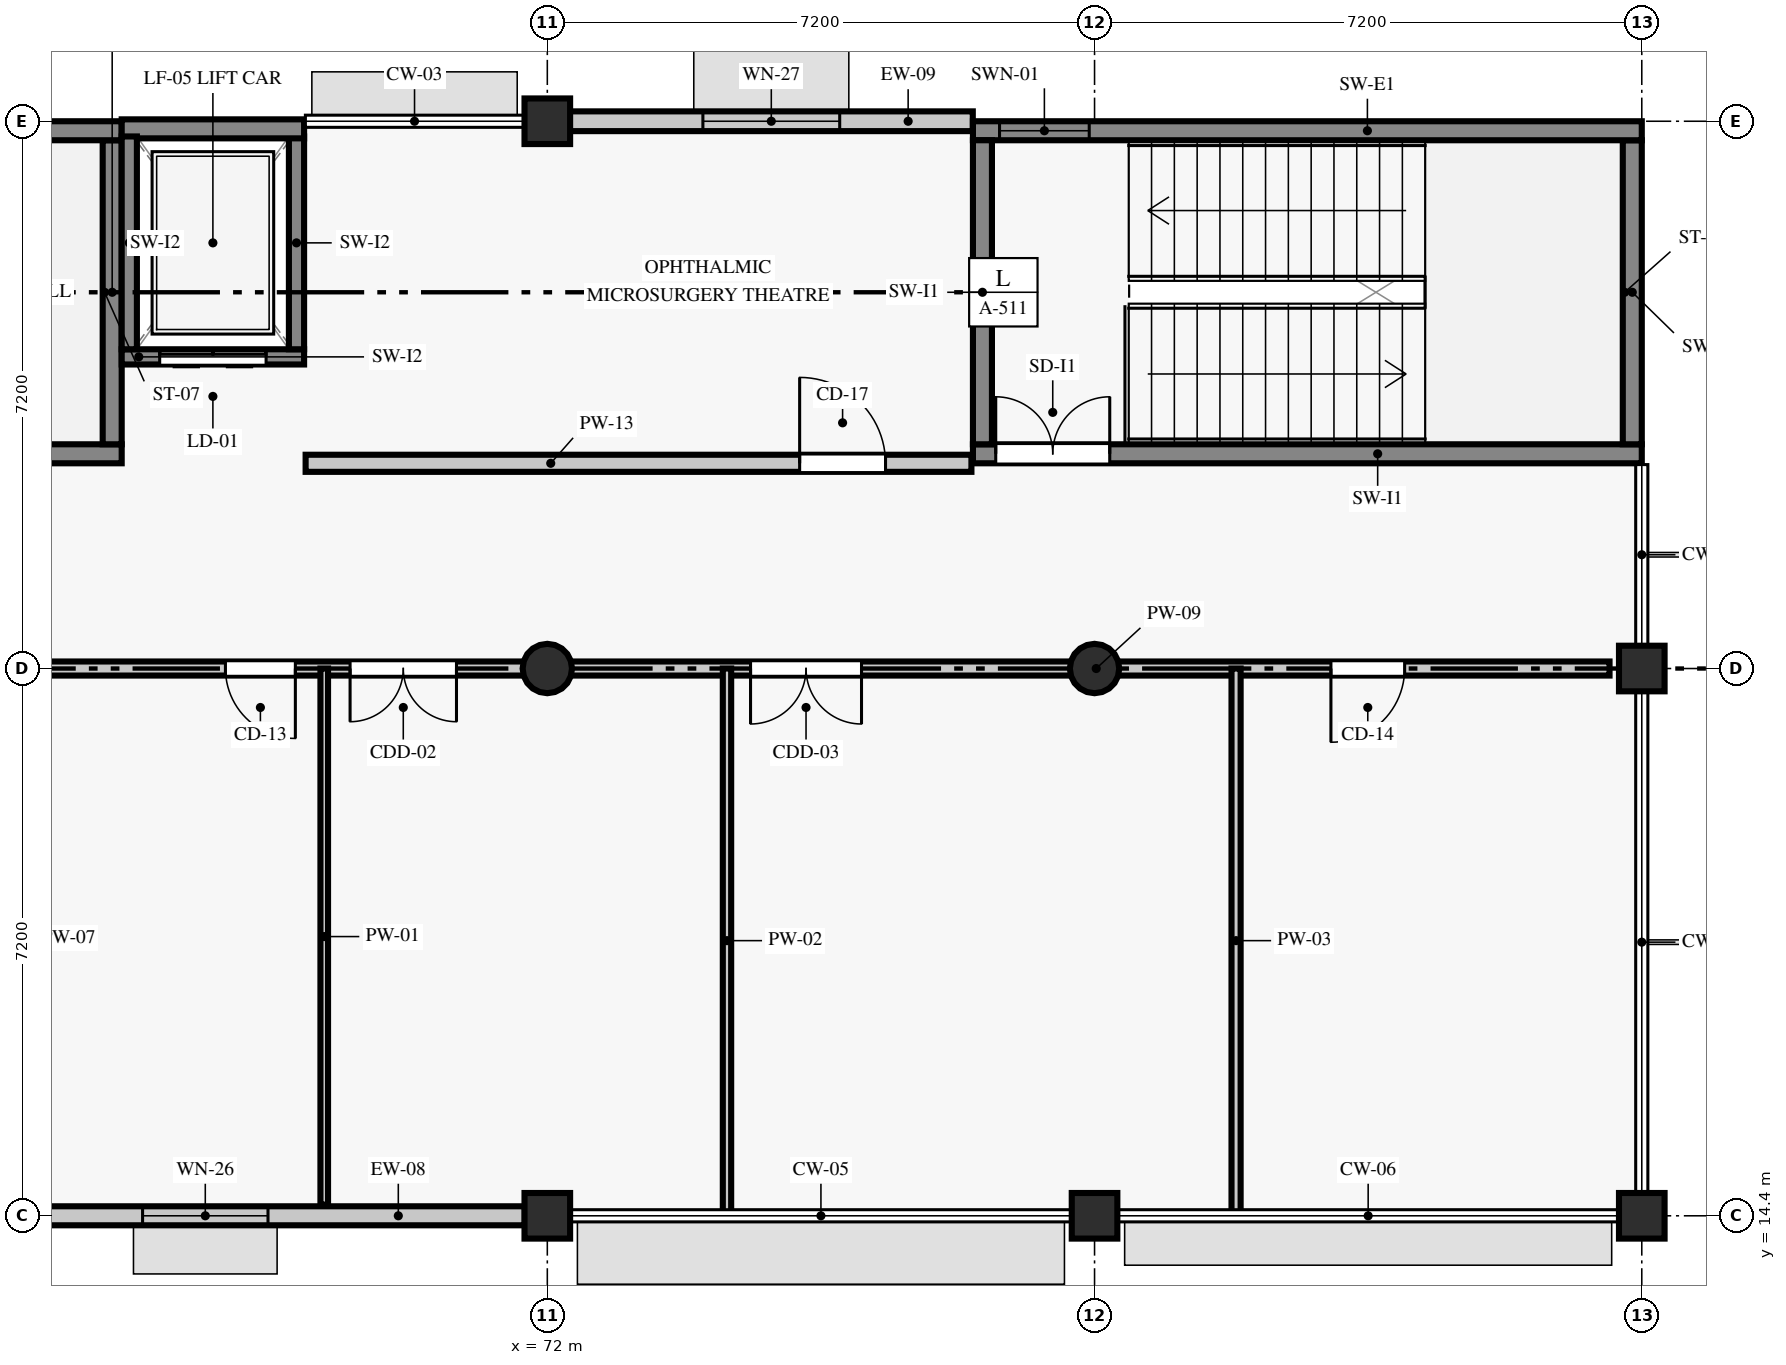
"""IFC4 building model, lengths in metres.
Left out: names, types, materials, properties, quantities, classifications, styles, units other than length and angle.
Written with IfcOpenShell. Run it as: python <this file> out.ifc"""

import sys

from ifc_helpers import new_model, si_unit, direction, frame, frame_2d, origin, origin_2d, place, context, subcontext, project, spatial, rectangle, circle, extrude, element, fill, save


model = new_model("IFC4")
c1 = context("Model", 3, precision=1e-05, world=origin(), true_north=direction((0.0, 1.0)))
c2 = subcontext(c1, "Body", "Model", "MODEL_VIEW")
j1 = project(units=[si_unit("LENGTHUNIT", "METRE"), si_unit("PLANEANGLEUNIT", "RADIAN")], contexts=[c1])
p1 = place(None, origin())
s1 = spatial("IfcSite", under=j1, at=p1, CompositionType="ELEMENT")
p2 = place(p1, origin())
s2 = spatial("IfcBuilding", under=s1, at=p2, CompositionType="ELEMENT")
p3 = place(p2, frame((0.0, 0.0, 9.6)))
s3 = spatial("IfcBuildingStorey", under=s2, at=p3, CompositionType="ELEMENT", Elevation=9.6)
p4 = place(p3, frame((72.0, 14.4, 0.0), z_axis=(0.0, 0.0, 1.0), x_axis=(1.0, 0.0, 0.0)))
e1 = element("IfcColumn", 1, at=p4, inside=s3, PredefinedType="COLUMN", context=c2, shape_type="SweptSolid", body=[
    extrude(rectangle(XDim=0.6, YDim=0.6, at=origin_2d()), origin(), (0.0, 0.0, 1.0), 3.9),
])
p5 = place(p3, frame((72.0, 21.6, 0.0), z_axis=(0.0, 0.0, 1.0), x_axis=(1.0, 0.0, 0.0)))
e2 = element("IfcColumn", 2, at=p5, inside=s3, PredefinedType="COLUMN", context=c2, shape_type="SweptSolid", body=[
    extrude(circle(Radius=0.325, at=origin_2d()), origin(), (0.0, 0.0, 1.0), 3.9),
])
for number, where, z_axis, x_axis in (
    (3, (72.0, 28.8, 0.0), (0.0, 0.0, 1.0), (1.0, 0.0, 0.0)),
    (4, (79.2, 14.4, 0.0), (0.0, 0.0, 1.0), (1.0, 0.0, 0.0)),
):
    element("IfcColumn", number, at=place(p3, frame(where, z_axis=z_axis, x_axis=x_axis)), inside=s3, PredefinedType="COLUMN", context=c2, shape_type="SweptSolid", body=[
        extrude(rectangle(XDim=0.6, YDim=0.6, at=origin_2d()), origin(), (0.0, 0.0, 1.0), 3.9),
    ])
p6 = place(p3, frame((79.2, 21.6, 0.0), z_axis=(0.0, 0.0, 1.0), x_axis=(1.0, 0.0, 0.0)))
e5 = element("IfcColumn", 5, at=p6, inside=s3, PredefinedType="COLUMN", context=c2, shape_type="SweptSolid", body=[
    extrude(circle(Radius=0.325, at=origin_2d()), origin(), (0.0, 0.0, 1.0), 3.9),
])
for number, where, z_axis, x_axis in (
    (6, (86.4, 14.4, 0.0), (0.0, 0.0, 1.0), (1.0, 0.0, 0.0)),
    (7, (86.4, 21.6, 0.0), (0.0, 0.0, 1.0), (1.0, 0.0, 0.0)),
):
    element("IfcColumn", number, at=place(p3, frame(where, z_axis=z_axis, x_axis=x_axis)), inside=s3, PredefinedType="COLUMN", context=c2, shape_type="SweptSolid", body=[
        extrude(rectangle(XDim=0.6, YDim=0.6, at=origin_2d()), origin(), (0.0, 0.0, 1.0), 3.9),
    ])
p7 = place(p3, frame((65.096, 14.4, 0.0), z_axis=(0.0, 0.0, 1.0), x_axis=(1.0, 0.0, 0.0)))
e8 = element("IfcWall", 8, at=p7, inside=s3, PredefinedType="STANDARD", context=c2, shape_type="SweptSolid", body=[
    extrude(rectangle(XDim=6.608, YDim=0.25, at=frame_2d((3.304, 0.0))), origin(), (0.0, 0.0, 1.0), 3.25),
])
p8 = place(p7, frame((1.579, 0.0, 0.9)))
e9 = element("IfcOpeningElement", 9, at=p8, cuts=e8, PredefinedType="OPENING", context=c2, shape_type="SweptSolid", body=[
    extrude(rectangle(XDim=1.65, YDim=1.54, at=frame_2d((0.825, 0.77))), frame((0.0, 0.135, 0.0), z_axis=(0.0, -1.0, 0.0), x_axis=(1.0, 0.0, 0.0)), (0.0, 0.0, 1.0), 0.27),
])
p9 = place(p3, frame((77.598, 28.8, 0.0), z_axis=(0.0, 0.0, 1.0), x_axis=(-1.0, 0.0, 0.0)))
e10 = element("IfcWall", 10, at=p9, inside=s3, PredefinedType="STANDARD", context=c2, shape_type="SweptSolid", body=[
    extrude(rectangle(XDim=5.302, YDim=0.26, at=frame_2d((2.651, 0.0))), origin(), (0.0, 0.0, 1.0), 3.9),
])
p10 = place(p9, frame((1.751, 0.0, 0.9)))
e11 = element("IfcOpeningElement", 11, at=p10, cuts=e10, PredefinedType="OPENING", context=c2, shape_type="SweptSolid", body=[
    extrude(rectangle(XDim=1.8, YDim=1.54, at=frame_2d((0.9, 0.77))), frame((0.0, 0.14, 0.0), z_axis=(0.0, -1.0, 0.0), x_axis=(1.0, 0.0, 0.0)), (0.0, 0.0, 1.0), 0.28),
])
p11 = place(p3, frame((57.6, 24.425, 0.0), z_axis=(0.0, 0.0, 1.0), x_axis=(1.0, 0.0, 0.0)))
e12 = element("IfcWall", 12, at=p11, inside=s3, PredefinedType="SHEAR", context=c2, shape_type="SweptSolid", body=[
    extrude(rectangle(XDim=8.8, YDim=0.25, at=frame_2d((4.4, 0.0))), origin(), (0.0, 0.0, 1.0), 3.9),
])
p12 = place(p11, frame((0.3, 0.0, 0.0)))
e13 = element("IfcOpeningElement", 13, at=p12, cuts=e12, PredefinedType="OPENING", context=c2, shape_type="SweptSolid", body=[
    extrude(rectangle(XDim=1.5, YDim=2.15, at=frame_2d((0.75, 1.075))), frame((0.0, 0.135, 0.0), z_axis=(0.0, -1.0, 0.0), x_axis=(1.0, 0.0, 0.0)), (0.0, 0.0, 1.0), 0.27),
])
p13 = place(p3, frame((66.275, 24.55, 0.0), z_axis=(0.0, 0.0, 1.0), x_axis=(0.0, 1.0, 0.0)))
e14 = element("IfcWall", 14, at=p13, inside=s3, PredefinedType="SHEAR", context=c2, shape_type="SweptSolid", body=[
    extrude(rectangle(XDim=4.0, YDim=0.25, at=frame_2d((2.0, 0.0))), origin(), (0.0, 0.0, 1.0), 3.9),
])
p14 = place(p3, frame((66.4, 28.675, 0.0), z_axis=(0.0, 0.0, 1.0), x_axis=(-1.0, 0.0, 0.0)))
e15 = element("IfcWall", 15, at=p14, inside=s3, PredefinedType="SHEAR", context=c2, shape_type="SweptSolid", body=[
    extrude(rectangle(XDim=8.8, YDim=0.25, at=frame_2d((4.4, 0.0))), origin(), (0.0, 0.0, 1.0), 3.9),
])
p15 = place(p14, frame((7.27, 0.0, 0.92)))
e16 = element("IfcOpeningElement", 16, at=p15, cuts=e15, PredefinedType="OPENING", context=c2, shape_type="SweptSolid", body=[
    extrude(rectangle(XDim=1.18, YDim=1.48, at=frame_2d((0.59, 0.74))), frame((0.0, 0.135, 0.0), z_axis=(0.0, -1.0, 0.0), x_axis=(1.0, 0.0, 0.0)), (0.0, 0.0, 1.0), 0.27),
])
p16 = place(p3, frame((77.6, 24.425, 0.0), z_axis=(0.0, 0.0, 1.0), x_axis=(1.0, 0.0, 0.0)))
e17 = element("IfcWall", 17, at=p16, inside=s3, PredefinedType="SHEAR", context=c2, shape_type="SweptSolid", body=[
    extrude(rectangle(XDim=8.8, YDim=0.25, at=frame_2d((4.4, 0.0))), origin(), (0.0, 0.0, 1.0), 3.9),
])
p17 = place(p16, frame((0.3, 0.0, 0.0)))
e18 = element("IfcOpeningElement", 18, at=p17, cuts=e17, PredefinedType="OPENING", context=c2, shape_type="SweptSolid", body=[
    extrude(rectangle(XDim=1.5, YDim=2.15, at=frame_2d((0.75, 1.075))), frame((0.0, 0.135, 0.0), z_axis=(0.0, -1.0, 0.0), x_axis=(1.0, 0.0, 0.0)), (0.0, 0.0, 1.0), 0.27),
])
p18 = place(p3, frame((86.275, 24.55, 0.0), z_axis=(0.0, 0.0, 1.0), x_axis=(0.0, 1.0, 0.0)))
e19 = element("IfcWall", 19, at=p18, inside=s3, PredefinedType="SHEAR", context=c2, shape_type="SweptSolid", body=[
    extrude(rectangle(XDim=4.0, YDim=0.25, at=frame_2d((2.0, 0.0))), origin(), (0.0, 0.0, 1.0), 3.9),
])
p19 = place(p3, frame((86.4, 28.675, 0.0), z_axis=(0.0, 0.0, 1.0), x_axis=(-1.0, 0.0, 0.0)))
e20 = element("IfcWall", 20, at=p19, inside=s3, PredefinedType="SHEAR", context=c2, shape_type="SweptSolid", body=[
    extrude(rectangle(XDim=8.8, YDim=0.25, at=frame_2d((4.4, 0.0))), origin(), (0.0, 0.0, 1.0), 3.9),
])
p20 = place(p19, frame((7.27, 0.0, 0.92)))
e21 = element("IfcOpeningElement", 21, at=p20, cuts=e20, PredefinedType="OPENING", context=c2, shape_type="SweptSolid", body=[
    extrude(rectangle(XDim=1.18, YDim=1.48, at=frame_2d((0.59, 0.74))), frame((0.0, 0.135, 0.0), z_axis=(0.0, -1.0, 0.0), x_axis=(1.0, 0.0, 0.0)), (0.0, 0.0, 1.0), 0.27),
])
p21 = place(p3, frame((77.725, 28.55, 0.0), z_axis=(0.0, 0.0, 1.0), x_axis=(0.0, -1.0, 0.0)))
e22 = element("IfcWall", 22, at=p21, inside=s3, PredefinedType="SHEAR", context=c2, shape_type="SweptSolid", body=[
    extrude(rectangle(XDim=4.0, YDim=0.25, at=frame_2d((2.0, 0.0))), origin(), (0.0, 0.0, 1.0), 3.9),
])
p22 = place(p3, frame((66.4, 25.7, 0.0), z_axis=(0.0, 0.0, 1.0), x_axis=(1.0, 0.0, 0.0)))
e23 = element("IfcWall", 23, at=p22, inside=s3, PredefinedType="SHEAR", context=c2, shape_type="SweptSolid", body=[
    extrude(rectangle(XDim=2.4, YDim=0.2, at=frame_2d((1.2, 0.0))), origin(), (0.0, 0.0, 1.0), 3.9),
])
p23 = place(p22, frame((0.5, 0.0, 0.0)))
e24 = element("IfcOpeningElement", 24, at=p23, cuts=e23, PredefinedType="OPENING", context=c2, shape_type="SweptSolid", body=[
    extrude(rectangle(XDim=1.4, YDim=2.15, at=frame_2d((0.7, 1.075))), frame((0.0, 0.11, 0.0), z_axis=(0.0, -1.0, 0.0), x_axis=(1.0, 0.0, 0.0)), (0.0, 0.0, 1.0), 0.22),
])
p24 = place(p3, frame((68.7, 25.8, 0.0), z_axis=(0.0, 0.0, 1.0), x_axis=(0.0, 1.0, 0.0)))
e25 = element("IfcWall", 25, at=p24, inside=s3, PredefinedType="SHEAR", context=c2, shape_type="SweptSolid", body=[
    extrude(rectangle(XDim=2.8, YDim=0.2, at=frame_2d((1.4, 0.0))), origin(), (0.0, 0.0, 1.0), 3.9),
])
p25 = place(p3, frame((68.8, 28.7, 0.0), z_axis=(0.0, 0.0, 1.0), x_axis=(-1.0, 0.0, 0.0)))
e26 = element("IfcWall", 26, at=p25, inside=s3, PredefinedType="SHEAR", context=c2, shape_type="SweptSolid", body=[
    extrude(rectangle(XDim=2.4, YDim=0.25, at=frame_2d((1.2, 0.0))), origin(), (0.0, 0.0, 1.0), 3.9),
])
p26 = place(p3, frame((66.5, 28.6, 0.0), z_axis=(0.0, 0.0, 1.0), x_axis=(0.0, -1.0, 0.0)))
e27 = element("IfcWall", 27, at=p26, inside=s3, PredefinedType="SHEAR", context=c2, shape_type="SweptSolid", body=[
    extrude(rectangle(XDim=2.8, YDim=0.2, at=frame_2d((1.4, 0.0))), origin(), (0.0, 0.0, 1.0), 3.9),
])
p27 = place(p3, frame((50.824, 21.6, 0.0), z_axis=(0.0, 0.0, 1.0), x_axis=(1.0, 0.0, 0.0)))
e28 = element("IfcWall", 28, at=p27, inside=s3, PredefinedType="PARTITIONING", context=c2, shape_type="SweptSolid", body=[
    extrude(rectangle(XDim=35.151, YDim=0.185, at=frame_2d((17.576, 0.0))), origin(), (0.0, 0.0, 1.0), 3.05),
])
p28 = place(p27, frame((2.548, 0.0, 0.0)))
e29 = element("IfcOpeningElement", 29, at=p28, cuts=e28, PredefinedType="OPENING", context=c2, shape_type="SweptSolid", body=[
    extrude(rectangle(XDim=1.34, YDim=2.14, at=frame_2d((0.67, 1.07))), frame((0.0, 0.103, 0.0), z_axis=(0.0, -1.0, 0.0), x_axis=(1.0, 0.0, 0.0)), (0.0, 0.0, 1.0), 0.205),
])
p29 = place(p27, frame((7.766, 0.0, 0.0)))
e30 = element("IfcOpeningElement", 30, at=p29, cuts=e28, PredefinedType="OPENING", context=c2, shape_type="SweptSolid", body=[
    extrude(rectangle(XDim=0.9, YDim=2.13, at=frame_2d((0.45, 1.065))), frame((0.0, 0.103, 0.0), z_axis=(0.0, -1.0, 0.0), x_axis=(1.0, 0.0, 0.0)), (0.0, 0.0, 1.0), 0.205),
])
p30 = place(p27, frame((9.886, 0.0, 0.0)))
e31 = element("IfcOpeningElement", 31, at=p30, cuts=e28, PredefinedType="OPENING", context=c2, shape_type="SweptSolid", body=[
    extrude(rectangle(XDim=0.92, YDim=2.18, at=frame_2d((0.46, 1.09))), frame((0.0, 0.103, 0.0), z_axis=(0.0, -1.0, 0.0), x_axis=(1.0, 0.0, 0.0)), (0.0, 0.0, 1.0), 0.205),
])
p31 = place(p27, frame((12.066, 0.0, 0.0)))
e32 = element("IfcOpeningElement", 32, at=p31, cuts=e28, PredefinedType="OPENING", context=c2, shape_type="SweptSolid", body=[
    extrude(rectangle(XDim=0.94, YDim=2.08, at=frame_2d((0.47, 1.04))), frame((0.0, 0.103, 0.0), z_axis=(0.0, -1.0, 0.0), x_axis=(1.0, 0.0, 0.0)), (0.0, 0.0, 1.0), 0.205),
])
p32 = place(p27, frame((16.941, 0.0, 0.0)))
e33 = element("IfcOpeningElement", 33, at=p32, cuts=e28, PredefinedType="OPENING", context=c2, shape_type="SweptSolid", body=[
    extrude(rectangle(XDim=0.92, YDim=2.18, at=frame_2d((0.46, 1.09))), frame((0.0, 0.103, 0.0), z_axis=(0.0, -1.0, 0.0), x_axis=(1.0, 0.0, 0.0)), (0.0, 0.0, 1.0), 0.205),
])
p33 = place(p27, frame((18.581, 0.0, 0.0)))
e34 = element("IfcOpeningElement", 34, at=p33, cuts=e28, PredefinedType="OPENING", context=c2, shape_type="SweptSolid", body=[
    extrude(rectangle(XDim=1.4, YDim=2.16, at=frame_2d((0.7, 1.08))), frame((0.0, 0.103, 0.0), z_axis=(0.0, -1.0, 0.0), x_axis=(1.0, 0.0, 0.0)), (0.0, 0.0, 1.0), 0.205),
])
p34 = place(p27, frame((23.85, 0.0, 0.0)))
e35 = element("IfcOpeningElement", 35, at=p34, cuts=e28, PredefinedType="OPENING", context=c2, shape_type="SweptSolid", body=[
    extrude(rectangle(XDim=1.46, YDim=2.18, at=frame_2d((0.73, 1.09))), frame((0.0, 0.103, 0.0), z_axis=(0.0, -1.0, 0.0), x_axis=(1.0, 0.0, 0.0)), (0.0, 0.0, 1.0), 0.205),
])
p35 = place(p27, frame((31.486, 0.0, 0.0)))
e36 = element("IfcOpeningElement", 36, at=p35, cuts=e28, PredefinedType="OPENING", context=c2, shape_type="SweptSolid", body=[
    extrude(rectangle(XDim=0.97, YDim=2.18, at=frame_2d((0.485, 1.09))), frame((0.0, 0.103, 0.0), z_axis=(0.0, -1.0, 0.0), x_axis=(1.0, 0.0, 0.0)), (0.0, 0.0, 1.0), 0.205),
])
p36 = place(p3, frame((69.065, 14.547, 0.0), z_axis=(0.0, 0.0, 1.0), x_axis=(0.0, 1.0, 0.0)))
e37 = element("IfcWall", 37, at=p36, inside=s3, PredefinedType="PARTITIONING", context=c2, shape_type="SweptSolid", body=[
    extrude(rectangle(XDim=7.053, YDim=0.1, at=frame_2d((3.526, 0.0))), origin(), (0.0, 0.0, 1.0), 3.05),
])
p37 = place(p3, frame((74.364, 14.44, 0.0), z_axis=(0.0, 0.0, 1.0), x_axis=(0.0, 1.0, 0.0)))
e38 = element("IfcWall", 38, at=p37, inside=s3, PredefinedType="PARTITIONING", context=c2, shape_type="SweptSolid", body=[
    extrude(rectangle(XDim=7.16, YDim=0.11, at=frame_2d((3.58, 0.0))), origin(), (0.0, 0.0, 1.0), 3.05),
])
p38 = place(p3, frame((81.062, 14.44, 0.0), z_axis=(0.0, 0.0, 1.0), x_axis=(0.0, 1.0, 0.0)))
e39 = element("IfcWall", 39, at=p38, inside=s3, PredefinedType="PARTITIONING", context=c2, shape_type="SweptSolid", body=[
    extrude(rectangle(XDim=7.16, YDim=0.12, at=frame_2d((3.58, 0.0))), origin(), (0.0, 0.0, 1.0), 3.05),
])
p39 = place(p3, frame((68.82, 24.3, 0.0), z_axis=(0.0, 0.0, 1.0), x_axis=(1.0, 0.0, 0.0)))
e40 = element("IfcWall", 40, at=p39, inside=s3, PredefinedType="PARTITIONING", context=c2, shape_type="SweptSolid", body=[
    extrude(rectangle(XDim=8.76, YDim=0.225, at=frame_2d((4.38, 0.0))), origin(), (0.0, 0.0, 1.0), 3.3),
])
p40 = place(p39, frame((6.5, 0.0, 0.0)))
e41 = element("IfcOpeningElement", 41, at=p40, cuts=e40, PredefinedType="OPENING", context=c2, shape_type="SweptSolid", body=[
    extrude(rectangle(XDim=1.13, YDim=2.18, at=frame_2d((0.565, 1.09))), frame((0.0, 0.123, 0.0), z_axis=(0.0, -1.0, 0.0), x_axis=(1.0, 0.0, 0.0)), (0.0, 0.0, 1.0), 0.245),
])
p41 = place(p8, origin())
e42 = element("IfcWindow", 42, at=p41, inside=s3, PartitioningType="SINGLE_PANEL", PredefinedType="WINDOW", context=c2, shape_type="SweptSolid", body=[
    extrude(rectangle(XDim=1.65, YDim=1.54, at=frame_2d((0.825, 0.77))), frame((0.0, 0.03, 0.0), z_axis=(0.0, -1.0, 0.0), x_axis=(1.0, 0.0, 0.0)), (0.0, 0.0, 1.0), 0.06),
])
fill(e9, e42)
p42 = place(p10, origin())
e43 = element("IfcWindow", 43, at=p42, inside=s3, PartitioningType="SINGLE_PANEL", PredefinedType="WINDOW", context=c2, shape_type="SweptSolid", body=[
    extrude(rectangle(XDim=1.8, YDim=1.54, at=frame_2d((0.9, 0.77))), frame((0.0, 0.03, 0.0), z_axis=(0.0, -1.0, 0.0), x_axis=(1.0, 0.0, 0.0)), (0.0, 0.0, 1.0), 0.06),
])
fill(e11, e43)
p43 = place(p17, origin())
e44 = element("IfcDoor", 44, at=p43, inside=s3, OperationType="DOUBLE_DOOR_SINGLE_SWING", PredefinedType="DOOR", context=c2, shape_type="SweptSolid", body=[
    extrude(rectangle(XDim=1.5, YDim=2.15, at=frame_2d((0.75, 1.075))), frame((0.0, 0.025, 0.0), z_axis=(0.0, -1.0, 0.0), x_axis=(1.0, 0.0, 0.0)), (0.0, 0.0, 1.0), 0.05),
])
fill(e18, e44)
p44 = place(p20, origin())
e45 = element("IfcWindow", 45, at=p44, inside=s3, PartitioningType="SINGLE_PANEL", PredefinedType="WINDOW", context=c2, shape_type="SweptSolid", body=[
    extrude(rectangle(XDim=1.18, YDim=1.48, at=frame_2d((0.59, 0.74))), frame((0.0, 0.03, 0.0), z_axis=(0.0, -1.0, 0.0), x_axis=(1.0, 0.0, 0.0)), (0.0, 0.0, 1.0), 0.06),
])
fill(e21, e45)
p45 = place(p23, frame((1.4, 0.0, 0.0), z_axis=(0.0, 0.0, 1.0), x_axis=(-1.0, 0.0, 0.0)))
e46 = element("IfcDoor", 46, at=p45, inside=s3, OperationType="DOUBLE_DOOR_SLIDING", PredefinedType="DOOR", context=c2, shape_type="SweptSolid", body=[
    extrude(rectangle(XDim=1.4, YDim=2.15, at=frame_2d((0.7, 1.075))), frame((0.0, 0.025, 0.0), z_axis=(0.0, -1.0, 0.0), x_axis=(1.0, 0.0, 0.0)), (0.0, 0.0, 1.0), 0.05),
])
fill(e24, e46)
p46 = place(p32, frame((0.92, 0.0, 0.0), z_axis=(0.0, 0.0, 1.0), x_axis=(-1.0, 0.0, 0.0)))
e47 = element("IfcDoor", 47, at=p46, inside=s3, OperationType="SINGLE_SWING_LEFT", PredefinedType="DOOR", context=c2, shape_type="SweptSolid", body=[
    extrude(rectangle(XDim=0.92, YDim=2.18, at=frame_2d((0.46, 1.09))), frame((0.0, 0.025, 0.0), z_axis=(0.0, -1.0, 0.0), x_axis=(1.0, 0.0, 0.0)), (0.0, 0.0, 1.0), 0.05),
])
fill(e33, e47)
p47 = place(p33, frame((1.4, 0.0, 0.0), z_axis=(0.0, 0.0, 1.0), x_axis=(-1.0, 0.0, 0.0)))
e48 = element("IfcDoor", 48, at=p47, inside=s3, OperationType="DOUBLE_DOOR_SINGLE_SWING", PredefinedType="DOOR", context=c2, shape_type="SweptSolid", body=[
    extrude(rectangle(XDim=1.4, YDim=2.16, at=frame_2d((0.7, 1.08))), frame((0.0, 0.025, 0.0), z_axis=(0.0, -1.0, 0.0), x_axis=(1.0, 0.0, 0.0)), (0.0, 0.0, 1.0), 0.05),
])
fill(e34, e48)
p48 = place(p34, frame((1.46, 0.0, 0.0), z_axis=(0.0, 0.0, 1.0), x_axis=(-1.0, 0.0, 0.0)))
e49 = element("IfcDoor", 49, at=p48, inside=s3, OperationType="DOUBLE_DOOR_SINGLE_SWING", PredefinedType="DOOR", context=c2, shape_type="SweptSolid", body=[
    extrude(rectangle(XDim=1.46, YDim=2.18, at=frame_2d((0.73, 1.09))), frame((0.0, 0.025, 0.0), z_axis=(0.0, -1.0, 0.0), x_axis=(1.0, 0.0, 0.0)), (0.0, 0.0, 1.0), 0.05),
])
fill(e35, e49)
p49 = place(p35, frame((0.97, 0.0, 0.0), z_axis=(0.0, 0.0, 1.0), x_axis=(-1.0, 0.0, 0.0)))
e50 = element("IfcDoor", 50, at=p49, inside=s3, OperationType="SINGLE_SWING_RIGHT", PredefinedType="DOOR", context=c2, shape_type="SweptSolid", body=[
    extrude(rectangle(XDim=0.97, YDim=2.18, at=frame_2d((0.485, 1.09))), frame((0.0, 0.025, 0.0), z_axis=(0.0, -1.0, 0.0), x_axis=(1.0, 0.0, 0.0)), (0.0, 0.0, 1.0), 0.05),
])
fill(e36, e50)
p50 = place(p40, origin())
e51 = element("IfcDoor", 51, at=p50, inside=s3, OperationType="SINGLE_SWING_LEFT", PredefinedType="DOOR", context=c2, shape_type="SweptSolid", body=[
    extrude(rectangle(XDim=1.13, YDim=2.18, at=frame_2d((0.565, 1.09))), frame((0.0, 0.025, 0.0), z_axis=(0.0, -1.0, 0.0), x_axis=(1.0, 0.0, 0.0)), (0.0, 0.0, 1.0), 0.05),
])
fill(e41, e51)
save(model, sys.argv[1])
